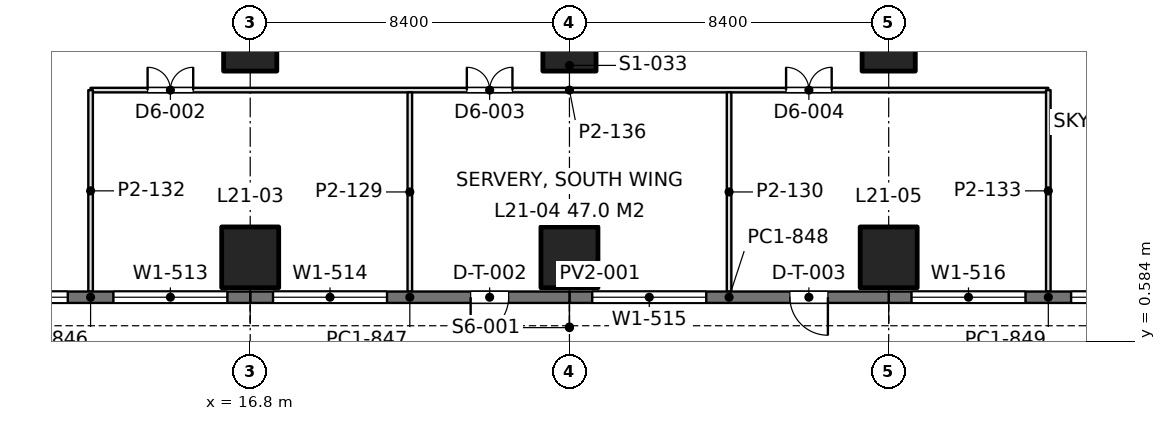
"""IFC4 building model, lengths in metres.
Left out: names, types, materials, properties, quantities, classifications, styles, units other than length and angle.
Written with IfcOpenShell. Run it as: python <this file> out.ifc"""

import sys

from ifc_helpers import new_model, si_unit, direction, frame, frame_2d, origin, origin_2d, place, context, subcontext, project, spatial, rectangle, extrude, element, fill, save


model = new_model("IFC4")
c1 = context("Model", 3, precision=1e-05, world=origin(), true_north=direction((0.0, 1.0)))
c2 = subcontext(c1, "Body", "Model", "MODEL_VIEW")
j1 = project(units=[si_unit("LENGTHUNIT", "METRE"), si_unit("PLANEANGLEUNIT", "RADIAN")], contexts=[c1])
p1 = place(None, origin())
s1 = spatial("IfcSite", under=j1, at=p1, CompositionType="ELEMENT")
p2 = place(p1, origin())
s2 = spatial("IfcBuilding", under=s1, at=p2, CompositionType="ELEMENT")
p3 = place(p2, frame((0.0, 0.0, 96.3)))
s3 = spatial("IfcBuildingStorey", under=s2, at=p3, CompositionType="ELEMENT", Elevation=96.3)
p4 = place(p3, frame((16.8, 2.8, -0.36), z_axis=(0.0, 0.0, 1.0), x_axis=(1.0, 0.0, 0.0)))
e1 = element("IfcColumn", 1, at=p4, inside=s3, PredefinedType="COLUMN", context=c2, shape_type="SweptSolid", body=[
    extrude(rectangle(XDim=1.5, YDim=1.6, at=origin_2d()), origin(), (0.0, 0.0, 1.0), 4.86),
])
p5 = place(p3, frame((16.8, 8.4, 0.0), z_axis=(0.0, 0.0, 1.0), x_axis=(1.0, 0.0, 0.0)))
e2 = element("IfcColumn", 2, at=p5, inside=s3, PredefinedType="COLUMN", context=c2, shape_type="SweptSolid", body=[
    extrude(rectangle(XDim=1.4, YDim=1.4, at=origin_2d()), origin(), (0.0, 0.0, 1.0), 4.5),
])
p6 = place(p3, frame((25.2, 2.8, -0.36), z_axis=(0.0, 0.0, 1.0), x_axis=(1.0, 0.0, 0.0)))
e3 = element("IfcColumn", 3, at=p6, inside=s3, PredefinedType="COLUMN", context=c2, shape_type="SweptSolid", body=[
    extrude(rectangle(XDim=1.5, YDim=1.6, at=origin_2d()), origin(), (0.0, 0.0, 1.0), 4.86),
])
p7 = place(p3, frame((25.2, 8.4, 0.0), z_axis=(0.0, 0.0, 1.0), x_axis=(1.0, 0.0, 0.0)))
e4 = element("IfcColumn", 4, at=p7, inside=s3, PredefinedType="COLUMN", context=c2, shape_type="SweptSolid", body=[
    extrude(rectangle(XDim=1.4, YDim=1.4, at=origin_2d()), origin(), (0.0, 0.0, 1.0), 4.5),
])
p8 = place(p3, frame((33.6, 2.8, -0.36), z_axis=(0.0, 0.0, 1.0), x_axis=(1.0, 0.0, 0.0)))
e5 = element("IfcColumn", 5, at=p8, inside=s3, PredefinedType="COLUMN", context=c2, shape_type="SweptSolid", body=[
    extrude(rectangle(XDim=1.5, YDim=1.6, at=origin_2d()), origin(), (0.0, 0.0, 1.0), 4.86),
])
p9 = place(p3, frame((33.6, 8.4, 0.0), z_axis=(0.0, 0.0, 1.0), x_axis=(1.0, 0.0, 0.0)))
e6 = element("IfcColumn", 6, at=p9, inside=s3, PredefinedType="COLUMN", context=c2, shape_type="SweptSolid", body=[
    extrude(rectangle(XDim=1.4, YDim=1.4, at=origin_2d()), origin(), (0.0, 0.0, 1.0), 4.5),
])
p10 = place(p3, frame((42.0, 1.75, 0.0), z_axis=(0.0, 0.0, 1.0), x_axis=(-1.0, 0.0, 0.0)))
e7 = element("IfcWall", 7, at=p10, inside=s3, PredefinedType="SOLIDWALL", context=c2, shape_type="SweptSolid", body=[
    extrude(rectangle(XDim=8.4, YDim=0.3, at=frame_2d((4.2, 0.0))), origin(), (0.0, 0.0, 1.0), 4.35),
])
p11 = place(p10, frame((0.6, 0.0, 0.9)))
e8 = element("IfcOpeningElement", 8, at=p11, cuts=e7, PredefinedType="OPENING", context=c2, shape_type="SweptSolid", body=[
    extrude(rectangle(XDim=3.0, YDim=1.9, at=frame_2d((1.5, 0.95))), frame((0.0, 0.16, 0.0), z_axis=(0.0, -1.0, 0.0), x_axis=(1.0, 0.0, 0.0)), (0.0, 0.0, 1.0), 0.32),
])
p12 = place(p10, frame((4.8, 0.0, 0.9)))
e9 = element("IfcOpeningElement", 9, at=p12, cuts=e7, PredefinedType="OPENING", context=c2, shape_type="SweptSolid", body=[
    extrude(rectangle(XDim=3.0, YDim=1.9, at=frame_2d((1.5, 0.95))), frame((0.0, 0.16, 0.0), z_axis=(0.0, -1.0, 0.0), x_axis=(1.0, 0.0, 0.0)), (0.0, 0.0, 1.0), 0.32),
])
p13 = place(p3, frame((33.6, 1.75, 0.0), z_axis=(0.0, 0.0, 1.0), x_axis=(-1.0, 0.0, 0.0)))
e10 = element("IfcWall", 10, at=p13, inside=s3, PredefinedType="SOLIDWALL", context=c2, shape_type="SweptSolid", body=[
    extrude(rectangle(XDim=8.4, YDim=0.3, at=frame_2d((4.2, 0.0))), origin(), (0.0, 0.0, 1.0), 4.35),
])
p14 = place(p13, frame((4.8, 0.0, 0.9)))
e11 = element("IfcOpeningElement", 11, at=p14, cuts=e10, PredefinedType="OPENING", context=c2, shape_type="SweptSolid", body=[
    extrude(rectangle(XDim=3.0, YDim=1.9, at=frame_2d((1.5, 0.95))), frame((0.0, 0.16, 0.0), z_axis=(0.0, -1.0, 0.0), x_axis=(1.0, 0.0, 0.0)), (0.0, 0.0, 1.0), 0.32),
])
p15 = place(p13, frame((1.6, 0.0, 0.0)))
e12 = element("IfcOpeningElement", 12, at=p15, cuts=e10, PredefinedType="OPENING", context=c2, shape_type="SweptSolid", body=[
    extrude(rectangle(XDim=1.0, YDim=2.4, at=frame_2d((0.5, 1.2))), frame((0.0, 0.16, 0.0), z_axis=(0.0, -1.0, 0.0), x_axis=(1.0, 0.0, 0.0)), (0.0, 0.0, 1.0), 0.32),
])
p16 = place(p3, frame((25.2, 1.75, 0.0), z_axis=(0.0, 0.0, 1.0), x_axis=(-1.0, 0.0, 0.0)))
e13 = element("IfcWall", 13, at=p16, inside=s3, PredefinedType="SOLIDWALL", context=c2, shape_type="SweptSolid", body=[
    extrude(rectangle(XDim=8.4, YDim=0.3, at=frame_2d((4.2, 0.0))), origin(), (0.0, 0.0, 1.0), 4.35),
])
p17 = place(p16, frame((4.8, 0.0, 0.9)))
e14 = element("IfcOpeningElement", 14, at=p17, cuts=e13, PredefinedType="OPENING", context=c2, shape_type="SweptSolid", body=[
    extrude(rectangle(XDim=3.0, YDim=1.9, at=frame_2d((1.5, 0.95))), frame((0.0, 0.16, 0.0), z_axis=(0.0, -1.0, 0.0), x_axis=(1.0, 0.0, 0.0)), (0.0, 0.0, 1.0), 0.32),
])
p18 = place(p16, frame((1.6, 0.0, 0.0)))
e15 = element("IfcOpeningElement", 15, at=p18, cuts=e13, PredefinedType="OPENING", context=c2, shape_type="SweptSolid", body=[
    extrude(rectangle(XDim=1.0, YDim=2.4, at=frame_2d((0.5, 1.2))), frame((0.0, 0.16, 0.0), z_axis=(0.0, -1.0, 0.0), x_axis=(1.0, 0.0, 0.0)), (0.0, 0.0, 1.0), 0.32),
])
p19 = place(p3, frame((16.8, 1.75, 0.0), z_axis=(0.0, 0.0, 1.0), x_axis=(-1.0, 0.0, 0.0)))
e16 = element("IfcWall", 16, at=p19, inside=s3, PredefinedType="SOLIDWALL", context=c2, shape_type="SweptSolid", body=[
    extrude(rectangle(XDim=8.4, YDim=0.3, at=frame_2d((4.2, 0.0))), origin(), (0.0, 0.0, 1.0), 4.35),
])
p20 = place(p19, frame((0.6, 0.0, 0.9)))
e17 = element("IfcOpeningElement", 17, at=p20, cuts=e16, PredefinedType="OPENING", context=c2, shape_type="SweptSolid", body=[
    extrude(rectangle(XDim=3.0, YDim=1.9, at=frame_2d((1.5, 0.95))), frame((0.0, 0.16, 0.0), z_axis=(0.0, -1.0, 0.0), x_axis=(1.0, 0.0, 0.0)), (0.0, 0.0, 1.0), 0.32),
])
p21 = place(p19, frame((4.8, 0.0, 0.9)))
e18 = element("IfcOpeningElement", 18, at=p21, cuts=e16, PredefinedType="OPENING", context=c2, shape_type="SweptSolid", body=[
    extrude(rectangle(XDim=3.0, YDim=1.9, at=frame_2d((1.5, 0.95))), frame((0.0, 0.16, 0.0), z_axis=(0.0, -1.0, 0.0), x_axis=(1.0, 0.0, 0.0)), (0.0, 0.0, 1.0), 0.32),
])
p22 = place(p3, frame((12.6, 7.2, 0.0), z_axis=(0.0, 0.0, 1.0), x_axis=(1.0, 0.0, 0.0)))
e19 = element("IfcWall", 19, at=p22, inside=s3, PredefinedType="PARTITIONING", context=c2, shape_type="SweptSolid", body=[
    extrude(rectangle(XDim=25.2, YDim=0.12, at=frame_2d((12.6, 0.0))), origin(), (0.0, 0.0, 1.0), 3.85),
])
p23 = place(p22, frame((1.5, 0.0, 0.0)))
e20 = element("IfcOpeningElement", 20, at=p23, cuts=e19, PredefinedType="OPENING", context=c2, shape_type="SweptSolid", body=[
    extrude(rectangle(XDim=1.2, YDim=2.2, at=frame_2d((0.6, 1.1))), frame((0.0, 0.07, 0.0), z_axis=(0.0, -1.0, 0.0), x_axis=(1.0, 0.0, 0.0)), (0.0, 0.0, 1.0), 0.14),
])
p24 = place(p22, frame((9.9, 0.0, 0.0)))
e21 = element("IfcOpeningElement", 21, at=p24, cuts=e19, PredefinedType="OPENING", context=c2, shape_type="SweptSolid", body=[
    extrude(rectangle(XDim=1.2, YDim=2.2, at=frame_2d((0.6, 1.1))), frame((0.0, 0.07, 0.0), z_axis=(0.0, -1.0, 0.0), x_axis=(1.0, 0.0, 0.0)), (0.0, 0.0, 1.0), 0.14),
])
p25 = place(p22, frame((18.3, 0.0, 0.0)))
e22 = element("IfcOpeningElement", 22, at=p25, cuts=e19, PredefinedType="OPENING", context=c2, shape_type="SweptSolid", body=[
    extrude(rectangle(XDim=1.2, YDim=2.2, at=frame_2d((0.6, 1.1))), frame((0.0, 0.07, 0.0), z_axis=(0.0, -1.0, 0.0), x_axis=(1.0, 0.0, 0.0)), (0.0, 0.0, 1.0), 0.14),
])
p26 = place(p3, frame((12.6, 1.898, 0.0), z_axis=(0.0, 0.0, 1.0), x_axis=(0.0, 1.0, 0.0)))
e23 = element("IfcWall", 23, at=p26, inside=s3, PredefinedType="PARTITIONING", context=c2, shape_type="SweptSolid", body=[
    extrude(rectangle(XDim=5.302, YDim=0.12, at=frame_2d((2.651, 0.0))), origin(), (0.0, 0.0, 1.0), 3.86),
])
for number, where, z_axis, x_axis in (
    (24, (21.0, 1.898, 0.0), (0.0, 0.0, 1.0), (0.0, 1.0, 0.0)),
    (25, (29.4, 1.898, 0.0), (0.0, 0.0, 1.0), (0.0, 1.0, 0.0)),
):
    element("IfcWall", number, at=place(p3, frame(where, z_axis=z_axis, x_axis=x_axis)), inside=s3, PredefinedType="PARTITIONING", context=c2, shape_type="SweptSolid", body=[
        extrude(rectangle(XDim=5.244, YDim=0.12, at=frame_2d((2.622, 0.0))), origin(), (0.0, 0.0, 1.0), 3.86),
    ])
p27 = place(p3, frame((37.8, 1.898, 0.0), z_axis=(0.0, 0.0, 1.0), x_axis=(0.0, 1.0, 0.0)))
e26 = element("IfcWall", 26, at=p27, inside=s3, PredefinedType="PARTITIONING", context=c2, shape_type="SweptSolid", body=[
    extrude(rectangle(XDim=5.302, YDim=0.12, at=frame_2d((2.651, 0.0))), origin(), (0.0, 0.0, 1.0), 3.86),
])
p28 = place(p11, origin())
e27 = element("IfcWindow", 27, at=p28, inside=s3, PartitioningType="SINGLE_PANEL", PredefinedType="WINDOW", context=c2, shape_type="SweptSolid", body=[
    extrude(rectangle(XDim=3.0, YDim=1.9, at=frame_2d((1.5, 0.95))), frame((0.0, 0.03, 0.0), z_axis=(0.0, -1.0, 0.0), x_axis=(1.0, 0.0, 0.0)), (0.0, 0.0, 1.0), 0.06),
])
fill(e8, e27)
p29 = place(p12, origin())
e28 = element("IfcWindow", 28, at=p29, inside=s3, PartitioningType="SINGLE_PANEL", PredefinedType="WINDOW", context=c2, shape_type="SweptSolid", body=[
    extrude(rectangle(XDim=3.0, YDim=1.9, at=frame_2d((1.5, 0.95))), frame((0.0, 0.03, 0.0), z_axis=(0.0, -1.0, 0.0), x_axis=(1.0, 0.0, 0.0)), (0.0, 0.0, 1.0), 0.06),
])
fill(e9, e28)
p30 = place(p14, origin())
e29 = element("IfcWindow", 29, at=p30, inside=s3, PartitioningType="SINGLE_PANEL", PredefinedType="WINDOW", context=c2, shape_type="SweptSolid", body=[
    extrude(rectangle(XDim=3.0, YDim=1.9, at=frame_2d((1.5, 0.95))), frame((0.0, 0.03, 0.0), z_axis=(0.0, -1.0, 0.0), x_axis=(1.0, 0.0, 0.0)), (0.0, 0.0, 1.0), 0.06),
])
fill(e11, e29)
p31 = place(p15, origin())
e30 = element("IfcDoor", 30, at=p31, inside=s3, OperationType="SINGLE_SWING_LEFT", PredefinedType="DOOR", context=c2, shape_type="SweptSolid", body=[
    extrude(rectangle(XDim=1.0, YDim=2.4, at=frame_2d((0.5, 1.2))), frame((0.0, 0.025, 0.0), z_axis=(0.0, -1.0, 0.0), x_axis=(1.0, 0.0, 0.0)), (0.0, 0.0, 1.0), 0.05),
])
fill(e12, e30)
p32 = place(p17, origin())
e31 = element("IfcWindow", 31, at=p32, inside=s3, PartitioningType="SINGLE_PANEL", PredefinedType="WINDOW", context=c2, shape_type="SweptSolid", body=[
    extrude(rectangle(XDim=3.0, YDim=1.9, at=frame_2d((1.5, 0.95))), frame((0.0, 0.03, 0.0), z_axis=(0.0, -1.0, 0.0), x_axis=(1.0, 0.0, 0.0)), (0.0, 0.0, 1.0), 0.06),
])
fill(e14, e31)
p33 = place(p18, origin())
e32 = element("IfcDoor", 32, at=p33, inside=s3, OperationType="SINGLE_SWING_RIGHT", PredefinedType="DOOR", context=c2, shape_type="SweptSolid", body=[
    extrude(rectangle(XDim=1.0, YDim=2.4, at=frame_2d((0.5, 1.2))), frame((0.0, 0.025, 0.0), z_axis=(0.0, -1.0, 0.0), x_axis=(1.0, 0.0, 0.0)), (0.0, 0.0, 1.0), 0.05),
])
fill(e15, e32)
p34 = place(p20, origin())
e33 = element("IfcWindow", 33, at=p34, inside=s3, PartitioningType="SINGLE_PANEL", PredefinedType="WINDOW", context=c2, shape_type="SweptSolid", body=[
    extrude(rectangle(XDim=3.0, YDim=1.9, at=frame_2d((1.5, 0.95))), frame((0.0, 0.03, 0.0), z_axis=(0.0, -1.0, 0.0), x_axis=(1.0, 0.0, 0.0)), (0.0, 0.0, 1.0), 0.06),
])
fill(e17, e33)
p35 = place(p21, origin())
e34 = element("IfcWindow", 34, at=p35, inside=s3, PartitioningType="SINGLE_PANEL", PredefinedType="WINDOW", context=c2, shape_type="SweptSolid", body=[
    extrude(rectangle(XDim=3.0, YDim=1.9, at=frame_2d((1.5, 0.95))), frame((0.0, 0.03, 0.0), z_axis=(0.0, -1.0, 0.0), x_axis=(1.0, 0.0, 0.0)), (0.0, 0.0, 1.0), 0.06),
])
fill(e18, e34)
p36 = place(p23, origin())
e35 = element("IfcDoor", 35, at=p36, inside=s3, OperationType="DOUBLE_DOOR_SINGLE_SWING_OPPOSITE_LEFT", PredefinedType="DOOR", context=c2, shape_type="SweptSolid", body=[
    extrude(rectangle(XDim=1.2, YDim=2.2, at=frame_2d((0.6, 1.1))), frame((0.0, 0.025, 0.0), z_axis=(0.0, -1.0, 0.0), x_axis=(1.0, 0.0, 0.0)), (0.0, 0.0, 1.0), 0.05),
])
fill(e20, e35)
p37 = place(p24, origin())
e36 = element("IfcDoor", 36, at=p37, inside=s3, OperationType="DOUBLE_DOOR_SINGLE_SWING_OPPOSITE_LEFT", PredefinedType="DOOR", context=c2, shape_type="SweptSolid", body=[
    extrude(rectangle(XDim=1.2, YDim=2.2, at=frame_2d((0.6, 1.1))), frame((0.0, 0.025, 0.0), z_axis=(0.0, -1.0, 0.0), x_axis=(1.0, 0.0, 0.0)), (0.0, 0.0, 1.0), 0.05),
])
fill(e21, e36)
p38 = place(p25, origin())
e37 = element("IfcDoor", 37, at=p38, inside=s3, OperationType="DOUBLE_DOOR_SINGLE_SWING_OPPOSITE_LEFT", PredefinedType="DOOR", context=c2, shape_type="SweptSolid", body=[
    extrude(rectangle(XDim=1.2, YDim=2.2, at=frame_2d((0.6, 1.1))), frame((0.0, 0.025, 0.0), z_axis=(0.0, -1.0, 0.0), x_axis=(1.0, 0.0, 0.0)), (0.0, 0.0, 1.0), 0.05),
])
fill(e22, e37)
save(model, sys.argv[1])
